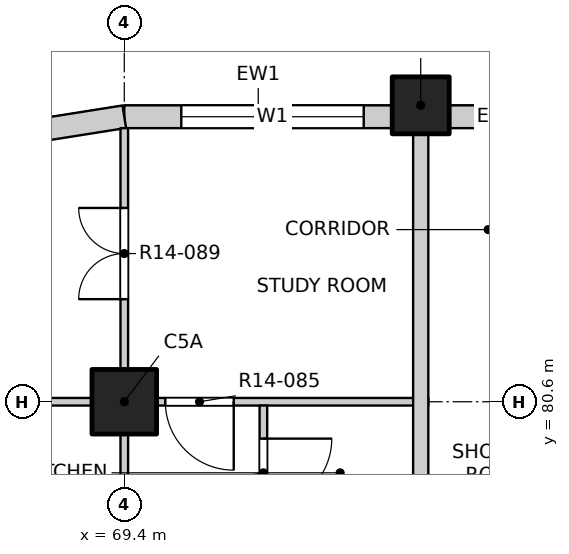
"""IFC4 building model, lengths in metres.
Left out: names, types, materials, properties, quantities, classifications, styles, units other than length and angle.
Written with IfcOpenShell. Run it as: python <this file> out.ifc"""

import sys

from ifc_helpers import new_model, si_unit, direction, frame, frame_2d, origin, origin_2d, place, context, subcontext, project, spatial, rectangle, extrude, element, fill, save


model = new_model("IFC4")
c1 = context("Model", 3, precision=1e-05, world=origin(), true_north=direction((0.0, 1.0)))
c2 = subcontext(c1, "Body", "Model", "MODEL_VIEW")
j1 = project(units=[si_unit("LENGTHUNIT", "METRE"), si_unit("PLANEANGLEUNIT", "RADIAN")], contexts=[c1])
p1 = place(None, origin())
s1 = spatial("IfcSite", under=j1, at=p1, CompositionType="ELEMENT")
p2 = place(p1, origin())
s2 = spatial("IfcBuilding", under=s1, at=p2, CompositionType="ELEMENT")
p3 = place(p2, frame((0.0, 0.0, 152.0)))
s3 = spatial("IfcBuildingStorey", under=s2, at=p3, CompositionType="ELEMENT", Elevation=152.0)
p4 = place(p3, frame((73.3, 84.5, -0.25), z_axis=(0.0, 0.0, 1.0), x_axis=(1.0, 0.0, 0.0)))
e1 = element("IfcColumn", 1, at=p4, inside=s3, PredefinedType="COLUMN", context=c2, shape_type="SweptSolid", body=[
    extrude(rectangle(XDim=0.75, YDim=0.75, at=origin_2d()), origin(), (0.0, 0.0, 1.0), 3.4),
])
p5 = place(p3, frame((69.4, 80.6, -0.25), z_axis=(0.0, 0.0, 1.0), x_axis=(1.0, 0.0, 0.0)))
e2 = element("IfcColumn", 2, at=p5, inside=s3, PredefinedType="COLUMN", context=c2, shape_type="SweptSolid", body=[
    extrude(rectangle(XDim=0.85, YDim=0.85, at=origin_2d()), origin(), (0.0, 0.0, 1.0), 3.4),
])
p6 = place(p3, frame((69.4, 84.35, 0.0), z_axis=(0.0, 0.0, 1.0), x_axis=(1.0, 0.0, 0.0)))
e3 = element("IfcWall", 3, at=p6, inside=s3, PredefinedType="SOLIDWALL", context=c2, shape_type="SweptSolid", body=[
    extrude(rectangle(XDim=3.525, YDim=0.3, at=frame_2d((1.763, 0.0))), origin(), (0.0, 0.0, 1.0), 2.7),
])
p7 = place(p6, frame((0.75, 0.0, 0.9)))
e4 = element("IfcOpeningElement", 4, at=p7, cuts=e3, PredefinedType="OPENING", context=c2, shape_type="SweptSolid", body=[
    extrude(rectangle(XDim=2.4, YDim=1.8, at=frame_2d((1.2, 0.9))), frame((0.0, 0.16, 0.0), z_axis=(0.0, -1.0, 0.0), x_axis=(1.0, 0.0, 0.0)), (0.0, 0.0, 1.0), 0.32),
])
p8 = place(p3, frame((73.675, 84.35, 0.0), z_axis=(0.0, 0.0, 1.0), x_axis=(1.0, 0.0, 0.0)))
e5 = element("IfcWall", 5, at=p8, inside=s3, PredefinedType="SOLIDWALL", context=c2, shape_type="SweptSolid", body=[
    extrude(rectangle(XDim=1.3, YDim=0.3, at=frame_2d((0.65, 0.0))), origin(), (0.0, 0.0, 1.0), 2.7),
])
p9 = place(p3, frame((69.4, 84.35, 0.0), z_axis=(0.0, 0.0, 1.0), x_axis=(-0.987678452879, -0.156496880861, 0.0)))
e6 = element("IfcWall", 6, at=p9, inside=s3, PredefinedType="SOLIDWALL", context=c2, shape_type="SweptSolid", body=[
    extrude(rectangle(XDim=1.173, YDim=0.3, at=frame_2d((0.586, 0.0))), origin(), (0.0, 0.0, 1.0), 2.7),
])
p10 = place(p3, frame((65.8, 80.6, 0.0), z_axis=(0.0, 0.0, 1.0), x_axis=(1.0, 0.0, 0.0)))
e7 = element("IfcWall", 7, at=p10, inside=s3, PredefinedType="PARTITIONING", context=c2, shape_type="SweptSolid", body=[
    extrude(rectangle(XDim=7.6, YDim=0.1, at=frame_2d((3.8, 0.0))), origin(), (0.0, 0.0, 1.0), 3.15),
])
p11 = place(p10, frame((4.14, 0.0, 0.0)))
e8 = element("IfcOpeningElement", 8, at=p11, cuts=e7, PredefinedType="OPENING", context=c2, shape_type="SweptSolid", body=[
    extrude(rectangle(XDim=0.9, YDim=2.1, at=frame_2d((0.45, 1.05))), frame((0.0, 0.06, 0.0), z_axis=(0.0, -1.0, 0.0), x_axis=(1.0, 0.0, 0.0)), (0.0, 0.0, 1.0), 0.12),
])
p12 = place(p3, frame((69.4, 45.8, 0.0), z_axis=(0.0, 0.0, 1.0), x_axis=(0.0, 1.0, 0.0)))
e9 = element("IfcWall", 9, at=p12, inside=s3, PredefinedType="PARTITIONING", context=c2, shape_type="SweptSolid", body=[
    extrude(rectangle(XDim=38.4, YDim=0.1, at=frame_2d((19.2, 0.0))), origin(), (0.0, 0.0, 1.0), 3.15),
])
p13 = place(p12, frame((1.05, 0.0, 0.0)))
e10 = element("IfcOpeningElement", 10, at=p13, cuts=e9, PredefinedType="OPENING", context=c2, shape_type="SweptSolid", body=[
    extrude(rectangle(XDim=1.2, YDim=2.1, at=frame_2d((0.6, 1.05))), frame((0.0, 0.06, 0.0), z_axis=(0.0, -1.0, 0.0), x_axis=(1.0, 0.0, 0.0)), (0.0, 0.0, 1.0), 0.12),
])
p14 = place(p12, frame((6.9, 0.0, 0.0)))
e11 = element("IfcOpeningElement", 11, at=p14, cuts=e9, PredefinedType="OPENING", context=c2, shape_type="SweptSolid", body=[
    extrude(rectangle(XDim=1.2, YDim=2.1, at=frame_2d((0.6, 1.05))), frame((0.0, 0.06, 0.0), z_axis=(0.0, -1.0, 0.0), x_axis=(1.0, 0.0, 0.0)), (0.0, 0.0, 1.0), 0.12),
])
p15 = place(p12, frame((12.9, 0.0, 0.0)))
e12 = element("IfcOpeningElement", 12, at=p15, cuts=e9, PredefinedType="OPENING", context=c2, shape_type="SweptSolid", body=[
    extrude(rectangle(XDim=0.9, YDim=2.1, at=frame_2d((0.45, 1.05))), frame((0.0, 0.06, 0.0), z_axis=(0.0, -1.0, 0.0), x_axis=(1.0, 0.0, 0.0)), (0.0, 0.0, 1.0), 0.12),
])
p16 = place(p12, frame((16.8, 0.0, 0.0)))
e13 = element("IfcOpeningElement", 13, at=p16, cuts=e9, PredefinedType="OPENING", context=c2, shape_type="SweptSolid", body=[
    extrude(rectangle(XDim=0.9, YDim=2.1, at=frame_2d((0.45, 1.05))), frame((0.0, 0.06, 0.0), z_axis=(0.0, -1.0, 0.0), x_axis=(1.0, 0.0, 0.0)), (0.0, 0.0, 1.0), 0.12),
])
p17 = place(p12, frame((20.7, 0.0, 0.0)))
e14 = element("IfcOpeningElement", 14, at=p17, cuts=e9, PredefinedType="OPENING", context=c2, shape_type="SweptSolid", body=[
    extrude(rectangle(XDim=0.9, YDim=2.1, at=frame_2d((0.45, 1.05))), frame((0.0, 0.06, 0.0), z_axis=(0.0, -1.0, 0.0), x_axis=(1.0, 0.0, 0.0)), (0.0, 0.0, 1.0), 0.12),
])
p18 = place(p12, frame((24.6, 0.0, 0.0)))
e15 = element("IfcOpeningElement", 15, at=p18, cuts=e9, PredefinedType="OPENING", context=c2, shape_type="SweptSolid", body=[
    extrude(rectangle(XDim=0.9, YDim=2.1, at=frame_2d((0.45, 1.05))), frame((0.0, 0.06, 0.0), z_axis=(0.0, -1.0, 0.0), x_axis=(1.0, 0.0, 0.0)), (0.0, 0.0, 1.0), 0.12),
])
p19 = place(p12, frame((28.5, 0.0, 0.0)))
e16 = element("IfcOpeningElement", 16, at=p19, cuts=e9, PredefinedType="OPENING", context=c2, shape_type="SweptSolid", body=[
    extrude(rectangle(XDim=0.9, YDim=2.1, at=frame_2d((0.45, 1.05))), frame((0.0, 0.06, 0.0), z_axis=(0.0, -1.0, 0.0), x_axis=(1.0, 0.0, 0.0)), (0.0, 0.0, 1.0), 0.12),
])
p20 = place(p12, frame((32.4, 0.0, 0.0)))
e17 = element("IfcOpeningElement", 17, at=p20, cuts=e9, PredefinedType="OPENING", context=c2, shape_type="SweptSolid", body=[
    extrude(rectangle(XDim=0.9, YDim=2.1, at=frame_2d((0.45, 1.05))), frame((0.0, 0.06, 0.0), z_axis=(0.0, -1.0, 0.0), x_axis=(1.0, 0.0, 0.0)), (0.0, 0.0, 1.0), 0.12),
])
p21 = place(p12, frame((36.15, 0.0, 0.0)))
e18 = element("IfcOpeningElement", 18, at=p21, cuts=e9, PredefinedType="OPENING", context=c2, shape_type="SweptSolid", body=[
    extrude(rectangle(XDim=1.2, YDim=2.1, at=frame_2d((0.6, 1.05))), frame((0.0, 0.06, 0.0), z_axis=(0.0, -1.0, 0.0), x_axis=(1.0, 0.0, 0.0)), (0.0, 0.0, 1.0), 0.12),
])
p22 = place(p3, frame((71.23, 75.95, 0.0), z_axis=(0.0, 0.0, 1.0), x_axis=(0.0, 1.0, 0.0)))
e19 = element("IfcWall", 19, at=p22, inside=s3, PredefinedType="PARTITIONING", context=c2, shape_type="SweptSolid", body=[
    extrude(rectangle(XDim=4.6, YDim=0.1, at=frame_2d((2.3, 0.0))), origin(), (0.0, 0.0, 1.0), 3.15),
])
p23 = place(p22, frame((0.29, 0.0, 0.0)))
e20 = element("IfcOpeningElement", 20, at=p23, cuts=e19, PredefinedType="OPENING", context=c2, shape_type="SweptSolid", body=[
    extrude(rectangle(XDim=0.8, YDim=2.1, at=frame_2d((0.4, 1.05))), frame((0.0, 0.06, 0.0), z_axis=(0.0, -1.0, 0.0), x_axis=(1.0, 0.0, 0.0)), (0.0, 0.0, 1.0), 0.12),
])
p24 = place(p22, frame((1.655, 0.0, 0.0)))
e21 = element("IfcOpeningElement", 21, at=p24, cuts=e19, PredefinedType="OPENING", context=c2, shape_type="SweptSolid", body=[
    extrude(rectangle(XDim=0.9, YDim=2.1, at=frame_2d((0.45, 1.05))), frame((0.0, 0.06, 0.0), z_axis=(0.0, -1.0, 0.0), x_axis=(1.0, 0.0, 0.0)), (0.0, 0.0, 1.0), 0.12),
])
p25 = place(p22, frame((3.265, 0.0, 0.0)))
e22 = element("IfcOpeningElement", 22, at=p25, cuts=e19, PredefinedType="OPENING", context=c2, shape_type="SweptSolid", body=[
    extrude(rectangle(XDim=0.9, YDim=2.1, at=frame_2d((0.45, 1.05))), frame((0.0, 0.06, 0.0), z_axis=(0.0, -1.0, 0.0), x_axis=(1.0, 0.0, 0.0)), (0.0, 0.0, 1.0), 0.12),
])
p26 = place(p3, frame((73.3, 49.5, 0.0), z_axis=(0.0, 0.0, 1.0), x_axis=(0.0, 1.0, 0.0)))
e23 = element("IfcWall", 23, at=p26, inside=s3, PredefinedType="PARTITIONING", context=c2, shape_type="SweptSolid", body=[
    extrude(rectangle(XDim=34.7, YDim=0.2, at=frame_2d((17.35, 0.0))), origin(), (0.0, 0.0, 1.0), 3.15),
])
p27 = place(p26, frame((10.125, 0.0, 0.0)))
e24 = element("IfcOpeningElement", 24, at=p27, cuts=e23, PredefinedType="OPENING", context=c2, shape_type="SweptSolid", body=[
    extrude(rectangle(XDim=1.0, YDim=2.1, at=frame_2d((0.5, 1.05))), frame((0.0, 0.11, 0.0), z_axis=(0.0, -1.0, 0.0), x_axis=(1.0, 0.0, 0.0)), (0.0, 0.0, 1.0), 0.22),
])
p28 = place(p26, frame((14.575, 0.0, 0.0)))
e25 = element("IfcOpeningElement", 25, at=p28, cuts=e23, PredefinedType="OPENING", context=c2, shape_type="SweptSolid", body=[
    extrude(rectangle(XDim=1.0, YDim=2.1, at=frame_2d((0.5, 1.05))), frame((0.0, 0.11, 0.0), z_axis=(0.0, -1.0, 0.0), x_axis=(1.0, 0.0, 0.0)), (0.0, 0.0, 1.0), 0.22),
])
p29 = place(p26, frame((26.575, 0.0, 0.0)))
e26 = element("IfcOpeningElement", 26, at=p29, cuts=e23, PredefinedType="OPENING", context=c2, shape_type="SweptSolid", body=[
    extrude(rectangle(XDim=1.0, YDim=2.1, at=frame_2d((0.5, 1.05))), frame((0.0, 0.11, 0.0), z_axis=(0.0, -1.0, 0.0), x_axis=(1.0, 0.0, 0.0)), (0.0, 0.0, 1.0), 0.22),
])
p30 = place(p7, origin())
e27 = element("IfcWindow", 27, at=p30, inside=s3, PartitioningType="DOUBLE_PANEL_VERTICAL", PredefinedType="WINDOW", context=c2, shape_type="SweptSolid", body=[
    extrude(rectangle(XDim=2.4, YDim=1.8, at=frame_2d((1.2, 0.9))), frame((0.0, 0.03, 0.0), z_axis=(0.0, -1.0, 0.0), x_axis=(1.0, 0.0, 0.0)), (0.0, 0.0, 1.0), 0.06),
])
fill(e4, e27)
p31 = place(p25, origin())
e28 = element("IfcDoor", 28, at=p31, inside=s3, OperationType="SINGLE_SWING_LEFT", PredefinedType="DOOR", context=c2, shape_type="SweptSolid", body=[
    extrude(rectangle(XDim=0.9, YDim=2.1, at=frame_2d((0.45, 1.05))), frame((0.0, 0.025, 0.0), z_axis=(0.0, -1.0, 0.0), x_axis=(1.0, 0.0, 0.0)), (0.0, 0.0, 1.0), 0.05),
])
fill(e22, e28)
p32 = place(p11, origin())
e29 = element("IfcDoor", 29, at=p32, inside=s3, OperationType="SINGLE_SWING_LEFT", PredefinedType="DOOR", context=c2, shape_type="SweptSolid", body=[
    extrude(rectangle(XDim=0.9, YDim=2.1, at=frame_2d((0.45, 1.05))), frame((0.0, 0.025, 0.0), z_axis=(0.0, -1.0, 0.0), x_axis=(1.0, 0.0, 0.0)), (0.0, 0.0, 1.0), 0.05),
])
fill(e8, e29)
p33 = place(p21, origin())
e30 = element("IfcDoor", 30, at=p33, inside=s3, OperationType="DOUBLE_DOOR_SINGLE_SWING", PredefinedType="DOOR", context=c2, shape_type="SweptSolid", body=[
    extrude(rectangle(XDim=1.2, YDim=2.1, at=frame_2d((0.6, 1.05))), frame((0.0, 0.025, 0.0), z_axis=(0.0, -1.0, 0.0), x_axis=(1.0, 0.0, 0.0)), (0.0, 0.0, 1.0), 0.05),
])
fill(e18, e30)
save(model, sys.argv[1])
